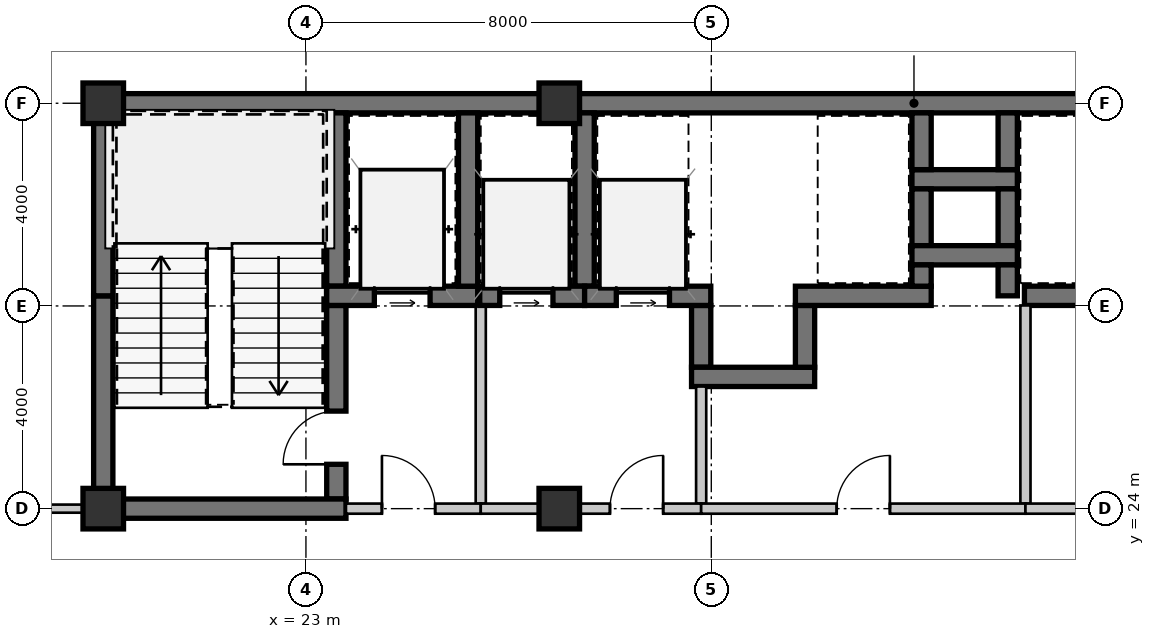
"""IFC4 building model, lengths in metres.
Left out: names, types, materials, properties, quantities, classifications, styles, units other than length and angle.
Written with IfcOpenShell. Run it as: python <this file> out.ifc"""

import sys

from ifc_helpers import new_model, si_unit, direction, frame, frame_2d, origin, origin_2d, place, context, subcontext, project, spatial, rectangle, extrude, source, transform, mapped, element, fill, save


model = new_model("IFC4")
c1 = context("Model", 3, precision=1e-05, world=origin(), true_north=direction((0.0, 1.0)))
c2 = subcontext(c1, "Body", "Model", "MODEL_VIEW")
j1 = project(units=[si_unit("LENGTHUNIT", "METRE"), si_unit("PLANEANGLEUNIT", "RADIAN")], contexts=[c1])
p1 = place(None, origin())
s1 = spatial("IfcSite", under=j1, at=p1, CompositionType="ELEMENT")
p2 = place(p1, origin())
s2 = spatial("IfcBuilding", under=s1, at=p2, CompositionType="ELEMENT")
p3 = place(p2, frame((0.0, 0.0, 32.55)))
s3 = spatial("IfcBuildingStorey", under=s2, at=p3, CompositionType="ELEMENT", Elevation=32.55)
m1 = source(origin(), c2, "Body", "SweptSolid", [
    extrude(rectangle(XDim=0.8, YDim=0.8, at=origin_2d()), origin(), (0.0, 0.0, 1.0), 3.15),
])
for number, where, z_axis, x_axis in (
    (1, (19.0, 24.0, 0.0), (0.0, 0.0, 1.0), (1.0, 0.0, 0.0)),
    (2, (28.0, 24.0, 0.0), (0.0, 0.0, 1.0), (1.0, 0.0, 0.0)),
    (3, (19.0, 32.0, 0.0), (0.0, 0.0, 1.0), (1.0, 0.0, 0.0)),
    (4, (28.0, 32.0, 0.0), (0.0, 0.0, 1.0), (1.0, 0.0, 0.0)),
):
    element("IfcColumn", number, at=place(p3, frame(where, z_axis=z_axis, x_axis=x_axis)), inside=s3, PredefinedType="COLUMN", context=c2, shape_type="MappedRepresentation", body=[
        mapped(m1, transform((0.0, 0.0, 0.0), scale=1.0)),
    ])
m2 = source(origin(), c2, "Body", "SweptSolid", [
    extrude(rectangle(XDim=9.19, YDim=0.38, at=frame_2d((4.595, 0.0))), origin(), (0.0, 0.0, 1.0), 2.93),
])
p4 = place(p3, frame((18.81, 32.0, 0.0), z_axis=(0.0, 0.0, 1.0), x_axis=(1.0, 0.0, 0.0)))
e5 = element("IfcWall", 5, at=p4, inside=s3, PredefinedType="SHEAR", context=c2, shape_type="MappedRepresentation", body=[
    mapped(m2, transform((0.0, 0.0, 0.0), scale=1.0)),
])
m3 = source(origin(), c2, "Body", "SweptSolid", [
    extrude(rectangle(XDim=11.2, YDim=0.38, at=frame_2d((5.6, 0.0))), origin(), (0.0, 0.0, 1.0), 2.93),
])
p5 = place(p3, frame((28.0, 32.0, 0.0), z_axis=(0.0, 0.0, 1.0), x_axis=(1.0, 0.0, 0.0)))
e6 = element("IfcWall", 6, at=p5, inside=s3, PredefinedType="SHEAR", context=c2, shape_type="MappedRepresentation", body=[
    mapped(m3, transform((0.0, 0.0, 0.0), scale=1.0)),
])
m4 = source(origin(), c2, "Body", "SweptSolid", [
    extrude(rectangle(XDim=4.01, YDim=0.38, at=frame_2d((2.005, 0.0))), origin(), (0.0, 0.0, 1.0), 2.93),
])
p6 = place(p3, frame((19.0, 24.19, 0.0), z_axis=(0.0, 0.0, 1.0), x_axis=(0.0, 1.0, 0.0)))
e7 = element("IfcWall", 7, at=p6, inside=s3, PredefinedType="SHEAR", context=c2, shape_type="MappedRepresentation", body=[
    mapped(m4, transform((0.0, 0.0, 0.0), scale=1.0)),
])
m5 = source(origin(), c2, "Body", "SweptSolid", [
    extrude(rectangle(XDim=3.61, YDim=0.38, at=frame_2d((1.805, 0.0))), origin(), (0.0, 0.0, 1.0), 2.93),
])
p7 = place(p3, frame((19.0, 28.2, 0.0), z_axis=(0.0, 0.0, 1.0), x_axis=(0.0, 1.0, 0.0)))
e8 = element("IfcWall", 8, at=p7, inside=s3, PredefinedType="SHEAR", context=c2, shape_type="MappedRepresentation", body=[
    mapped(m5, transform((0.0, 0.0, 0.0), scale=1.0)),
])
m6 = source(origin(), c2, "Body", "SweptSolid", [
    extrude(rectangle(XDim=3.42, YDim=0.38, at=frame_2d((1.71, 0.0))), origin(), (0.0, 0.0, 1.0), 2.93),
])
p8 = place(p3, frame((23.6, 28.39, 0.0), z_axis=(0.0, 0.0, 1.0), x_axis=(0.0, 1.0, 0.0)))
e9 = element("IfcWall", 9, at=p8, inside=s3, PredefinedType="SHEAR", context=c2, shape_type="MappedRepresentation", body=[
    mapped(m6, transform((0.0, 0.0, 0.0), scale=1.0)),
])
m7 = source(origin(), c2, "Body", "SweptSolid", [
    extrude(rectangle(XDim=3.82, YDim=0.38, at=frame_2d((1.91, 0.0))), origin(), (0.0, 0.0, 1.0), 2.93),
])
p9 = place(p3, frame((23.6, 24.19, 0.0), z_axis=(0.0, 0.0, 1.0), x_axis=(0.0, 1.0, 0.0)))
e10 = element("IfcWall", 10, at=p9, inside=s3, PredefinedType="SHEAR", context=c2, shape_type="MappedRepresentation", body=[
    mapped(m7, transform((0.0, 0.0, 0.0), scale=1.0)),
])
m8 = source(origin(), c2, "Body", "SweptSolid", [
    extrude(rectangle(XDim=1.05, YDim=2.1, at=frame_2d((0.525, 1.05))), frame((0.0, 0.2, 0.0), z_axis=(0.0, -1.0, 0.0), x_axis=(1.0, 0.0, 0.0)), (0.0, 0.0, 1.0), 0.4),
])
p10 = place(p9, frame((0.685, 0.0, 0.0)))
e11 = element("IfcOpeningElement", 11, at=p10, cuts=e10, PredefinedType="OPENING", context=c2, shape_type="MappedRepresentation", body=[
    mapped(m8, transform((0.0, 0.0, 0.0), scale=1.0)),
])
m9 = source(origin(), c2, "Body", "SweptSolid", [
    extrude(rectangle(XDim=4.98, YDim=0.38, at=frame_2d((2.49, 0.0))), origin(), (0.0, 0.0, 1.0), 2.93),
])
p11 = place(p3, frame((18.81, 24.0, 0.0), z_axis=(0.0, 0.0, 1.0), x_axis=(1.0, 0.0, 0.0)))
e12 = element("IfcWall", 12, at=p11, inside=s3, PredefinedType="SHEAR", context=c2, shape_type="MappedRepresentation", body=[
    mapped(m9, transform((0.0, 0.0, 0.0), scale=1.0)),
])
m10 = source(origin(), c2, "Body", "SweptSolid", [
    extrude(rectangle(XDim=2.98, YDim=0.38, at=frame_2d((1.49, 0.0))), origin(), (0.0, 0.0, 1.0), 2.93),
])
p12 = place(p3, frame((23.41, 28.2, 0.0), z_axis=(0.0, 0.0, 1.0), x_axis=(1.0, 0.0, 0.0)))
e13 = element("IfcWall", 13, at=p12, inside=s3, PredefinedType="SHEAR", context=c2, shape_type="MappedRepresentation", body=[
    mapped(m10, transform((0.0, 0.0, 0.0), scale=1.0)),
])
m11 = source(origin(), c2, "Body", "SweptSolid", [
    extrude(rectangle(XDim=1.1, YDim=2.15, at=frame_2d((0.55, 1.075))), frame((0.0, 0.2, 0.0), z_axis=(0.0, -1.0, 0.0), x_axis=(1.0, 0.0, 0.0)), (0.0, 0.0, 1.0), 0.4),
])
p13 = place(p12, frame((0.94, 0.0, 0.0)))
e14 = element("IfcOpeningElement", 14, at=p13, cuts=e13, PredefinedType="OPENING", context=c2, shape_type="MappedRepresentation", body=[
    mapped(m11, transform((0.0, 0.0, 0.0), scale=1.0)),
])
p14 = place(p3, frame((26.2, 28.39, 0.0), z_axis=(0.0, 0.0, 1.0), x_axis=(0.0, 1.0, 0.0)))
e15 = element("IfcWall", 15, at=p14, inside=s3, PredefinedType="SHEAR", context=c2, shape_type="MappedRepresentation", body=[
    mapped(m6, transform((0.0, 0.0, 0.0), scale=1.0)),
])
m12 = source(origin(), c2, "Body", "SweptSolid", [
    extrude(rectangle(XDim=3.91, YDim=0.2, at=frame_2d((1.955, 0.0))), origin(), (0.0, 0.0, 1.0), 2.93),
])
p15 = place(p3, frame((26.45, 24.1, 0.0), z_axis=(0.0, 0.0, 1.0), x_axis=(0.0, 1.0, 0.0)))
e16 = element("IfcWall", 16, at=p15, inside=s3, PredefinedType="SOLIDWALL", context=c2, shape_type="MappedRepresentation", body=[
    mapped(m12, transform((0.0, 0.0, 0.0), scale=1.0)),
])
m13 = source(origin(), c2, "Body", "SweptSolid", [
    extrude(rectangle(XDim=2.66, YDim=0.2, at=frame_2d((1.33, 0.0))), origin(), (0.0, 0.0, 1.0), 2.47),
])
p16 = place(p3, frame((23.79, 24.0, 0.0), z_axis=(0.0, 0.0, 1.0), x_axis=(1.0, 0.0, 0.0)))
e17 = element("IfcWall", 17, at=p16, inside=s3, PredefinedType="SOLIDWALL", context=c2, shape_type="MappedRepresentation", body=[
    mapped(m13, transform((0.0, 0.0, 0.0), scale=1.0)),
])
m14 = source(origin(), c2, "Body", "SweptSolid", [
    extrude(rectangle(XDim=1.05, YDim=2.1, at=frame_2d((0.525, 1.05))), frame((0.0, 0.11, 0.0), z_axis=(0.0, -1.0, 0.0), x_axis=(1.0, 0.0, 0.0)), (0.0, 0.0, 1.0), 0.22),
])
p17 = place(p16, frame((0.71, 0.0, 0.0)))
e18 = element("IfcOpeningElement", 18, at=p17, cuts=e17, PredefinedType="OPENING", context=c2, shape_type="MappedRepresentation", body=[
    mapped(m14, transform((0.0, 0.0, 0.0), scale=1.0)),
])
m15 = source(origin(), c2, "Body", "SweptSolid", [
    extrude(rectangle(XDim=2.08, YDim=0.38, at=frame_2d((1.04, 0.0))), origin(), (0.0, 0.0, 1.0), 2.93),
])
p18 = place(p3, frame((34.96, 30.5, 0.0), z_axis=(0.0, 0.0, 1.0), x_axis=(1.0, 0.0, 0.0)))
e19 = element("IfcWall", 19, at=p18, inside=s3, PredefinedType="SHEAR", context=c2, shape_type="MappedRepresentation", body=[
    mapped(m15, transform((0.0, 0.0, 0.0), scale=1.0)),
])
m16 = source(origin(), c2, "Body", "SweptSolid", [
    extrude(rectangle(XDim=1.12, YDim=0.38, at=frame_2d((0.56, 0.0))), origin(), (0.0, 0.0, 1.0), 2.93),
])
for number, where, z_axis, x_axis in (
    (20, (35.15, 31.81, 0.0), (0.0, 0.0, 1.0), (0.0, -1.0, 0.0)),
    (21, (36.85, 30.69, 0.0), (0.0, 0.0, 1.0), (0.0, 1.0, 0.0)),
    (22, (35.15, 30.31, 0.0), (0.0, 0.0, 1.0), (0.0, -1.0, 0.0)),
    (23, (36.85, 29.19, 0.0), (0.0, 0.0, 1.0), (0.0, 1.0, 0.0)),
):
    element("IfcWall", number, at=place(p3, frame(where, z_axis=z_axis, x_axis=x_axis)), inside=s3, PredefinedType="SHEAR", context=c2, shape_type="MappedRepresentation", body=[
        mapped(m16, transform((0.0, 0.0, 0.0), scale=1.0)),
    ])
p19 = place(p3, frame((34.96, 29.0, 0.0), z_axis=(0.0, 0.0, 1.0), x_axis=(1.0, 0.0, 0.0)))
e24 = element("IfcWall", 24, at=p19, inside=s3, PredefinedType="SHEAR", context=c2, shape_type="MappedRepresentation", body=[
    mapped(m15, transform((0.0, 0.0, 0.0), scale=1.0)),
])
m17 = source(origin(), c2, "Body", "SweptSolid", [
    extrude(rectangle(XDim=1.22, YDim=0.38, at=frame_2d((0.61, 0.0))), origin(), (0.0, 0.0, 1.0), 2.93),
])
p20 = place(p3, frame((30.8, 28.01, 0.0), z_axis=(0.0, 0.0, 1.0), x_axis=(0.0, -1.0, 0.0)))
e25 = element("IfcWall", 25, at=p20, inside=s3, PredefinedType="SHEAR", context=c2, shape_type="MappedRepresentation", body=[
    mapped(m17, transform((0.0, 0.0, 0.0), scale=1.0)),
])
m18 = source(origin(), c2, "Body", "SweptSolid", [
    extrude(rectangle(XDim=2.43, YDim=0.38, at=frame_2d((1.215, 0.0))), origin(), (0.0, 0.0, 1.0), 2.93),
])
p21 = place(p3, frame((30.61, 26.6, 0.0), z_axis=(0.0, 0.0, 1.0), x_axis=(1.0, 0.0, 0.0)))
e26 = element("IfcWall", 26, at=p21, inside=s3, PredefinedType="SHEAR", context=c2, shape_type="MappedRepresentation", body=[
    mapped(m18, transform((0.0, 0.0, 0.0), scale=1.0)),
])
p22 = place(p3, frame((32.85, 26.79, 0.0), z_axis=(0.0, 0.0, 1.0), x_axis=(0.0, 1.0, 0.0)))
e27 = element("IfcWall", 27, at=p22, inside=s3, PredefinedType="SHEAR", context=c2, shape_type="MappedRepresentation", body=[
    mapped(m17, transform((0.0, 0.0, 0.0), scale=1.0)),
])
p23 = place(p3, frame((28.5, 28.39, 0.0), z_axis=(0.0, 0.0, 1.0), x_axis=(0.0, 1.0, 0.0)))
e28 = element("IfcWall", 28, at=p23, inside=s3, PredefinedType="SHEAR", context=c2, shape_type="MappedRepresentation", body=[
    mapped(m6, transform((0.0, 0.0, 0.0), scale=1.0)),
])
m19 = source(origin(), c2, "Body", "SweptSolid", [
    extrude(rectangle(XDim=2.07, YDim=0.38, at=frame_2d((1.035, 0.0))), origin(), (0.0, 0.0, 1.0), 2.93),
])
p24 = place(p3, frame((26.43, 28.2, 0.0), z_axis=(0.0, 0.0, 1.0), x_axis=(1.0, 0.0, 0.0)))
e29 = element("IfcWall", 29, at=p24, inside=s3, PredefinedType="SHEAR", context=c2, shape_type="MappedRepresentation", body=[
    mapped(m19, transform((0.0, 0.0, 0.0), scale=1.0)),
])
m20 = source(origin(), c2, "Body", "SweptSolid", [
    extrude(rectangle(XDim=1.05, YDim=2.15, at=frame_2d((0.525, 1.075))), frame((0.0, 0.2, 0.0), z_axis=(0.0, -1.0, 0.0), x_axis=(1.0, 0.0, 0.0)), (0.0, 0.0, 1.0), 0.4),
])
p25 = place(p24, frame((0.395, 0.0, 0.0)))
e30 = element("IfcOpeningElement", 30, at=p25, cuts=e29, PredefinedType="OPENING", context=c2, shape_type="MappedRepresentation", body=[
    mapped(m20, transform((0.0, 0.0, 0.0), scale=1.0)),
])
m21 = source(origin(), c2, "Body", "SweptSolid", [
    extrude(rectangle(XDim=2.49, YDim=0.38, at=frame_2d((1.245, 0.0))), origin(), (0.0, 0.0, 1.0), 2.93),
])
p26 = place(p3, frame((28.5, 28.2, 0.0), z_axis=(0.0, 0.0, 1.0), x_axis=(1.0, 0.0, 0.0)))
e31 = element("IfcWall", 31, at=p26, inside=s3, PredefinedType="SHEAR", context=c2, shape_type="MappedRepresentation", body=[
    mapped(m21, transform((0.0, 0.0, 0.0), scale=1.0)),
])
p27 = place(p26, frame((0.625, 0.0, 0.0)))
e32 = element("IfcOpeningElement", 32, at=p27, cuts=e31, PredefinedType="OPENING", context=c2, shape_type="MappedRepresentation", body=[
    mapped(m20, transform((0.0, 0.0, 0.0), scale=1.0)),
])
m22 = source(origin(), c2, "Body", "SweptSolid", [
    extrude(rectangle(XDim=2.31, YDim=0.2, at=frame_2d((1.155, 0.0))), origin(), (0.0, 0.0, 1.0), 2.93),
])
p28 = place(p3, frame((30.8, 26.41, 0.0), z_axis=(0.0, 0.0, 1.0), x_axis=(0.0, -1.0, 0.0)))
e33 = element("IfcWall", 33, at=p28, inside=s3, PredefinedType="SOLIDWALL", context=c2, shape_type="MappedRepresentation", body=[
    mapped(m22, transform((0.0, 0.0, 0.0), scale=1.0)),
])
m23 = source(origin(), c2, "Body", "SweptSolid", [
    extrude(rectangle(XDim=4.35, YDim=0.2, at=frame_2d((2.175, 0.0))), origin(), (0.0, 0.0, 1.0), 2.47),
])
p29 = place(p3, frame((30.8, 24.0, 0.0), z_axis=(0.0, 0.0, 1.0), x_axis=(-1.0, 0.0, 0.0)))
e34 = element("IfcWall", 34, at=p29, inside=s3, PredefinedType="SOLIDWALL", context=c2, shape_type="MappedRepresentation", body=[
    mapped(m23, transform((0.0, 0.0, 0.0), scale=1.0)),
])
p30 = place(p29, frame((0.75, 0.0, 0.0)))
e35 = element("IfcOpeningElement", 35, at=p30, cuts=e34, PredefinedType="OPENING", context=c2, shape_type="MappedRepresentation", body=[
    mapped(m14, transform((0.0, 0.0, 0.0), scale=1.0)),
])
m24 = source(origin(), c2, "Body", "SweptSolid", [
    extrude(rectangle(XDim=2.68, YDim=0.38, at=frame_2d((1.34, 0.0))), origin(), (0.0, 0.0, 1.0), 2.93),
])
p31 = place(p3, frame((32.66, 28.2, 0.0), z_axis=(0.0, 0.0, 1.0), x_axis=(1.0, 0.0, 0.0)))
e36 = element("IfcWall", 36, at=p31, inside=s3, PredefinedType="SHEAR", context=c2, shape_type="MappedRepresentation", body=[
    mapped(m24, transform((0.0, 0.0, 0.0), scale=1.0)),
])
m25 = source(origin(), c2, "Body", "SweptSolid", [
    extrude(rectangle(XDim=0.42, YDim=0.38, at=frame_2d((0.21, 0.0))), origin(), (0.0, 0.0, 1.0), 2.93),
])
p32 = place(p3, frame((35.15, 28.39, 0.0), z_axis=(0.0, 0.0, 1.0), x_axis=(0.0, 1.0, 0.0)))
e37 = element("IfcWall", 37, at=p32, inside=s3, PredefinedType="SHEAR", context=c2, shape_type="MappedRepresentation", body=[
    mapped(m25, transform((0.0, 0.0, 0.0), scale=1.0)),
])
m26 = source(origin(), c2, "Body", "SweptSolid", [
    extrude(rectangle(XDim=0.61, YDim=0.38, at=frame_2d((0.305, 0.0))), origin(), (0.0, 0.0, 1.0), 2.93),
])
p33 = place(p3, frame((36.85, 28.81, 0.0), z_axis=(0.0, 0.0, 1.0), x_axis=(0.0, -1.0, 0.0)))
e38 = element("IfcWall", 38, at=p33, inside=s3, PredefinedType="SHEAR", context=c2, shape_type="MappedRepresentation", body=[
    mapped(m26, transform((0.0, 0.0, 0.0), scale=1.0)),
])
m27 = source(origin(), c2, "Body", "SweptSolid", [
    extrude(rectangle(XDim=2.02, YDim=0.38, at=frame_2d((1.01, 0.0))), origin(), (0.0, 0.0, 1.0), 2.93),
])
p34 = place(p3, frame((37.18, 28.2, 0.0), z_axis=(0.0, 0.0, 1.0), x_axis=(1.0, 0.0, 0.0)))
e39 = element("IfcWall", 39, at=p34, inside=s3, PredefinedType="SHEAR", context=c2, shape_type="MappedRepresentation", body=[
    mapped(m27, transform((0.0, 0.0, 0.0), scale=1.0)),
])
p35 = place(p3, frame((37.2, 28.01, 0.0), z_axis=(0.0, 0.0, 1.0), x_axis=(0.0, -1.0, 0.0)))
e40 = element("IfcWall", 40, at=p35, inside=s3, PredefinedType="SOLIDWALL", context=c2, shape_type="MappedRepresentation", body=[
    mapped(m12, transform((0.0, 0.0, 0.0), scale=1.0)),
])
m28 = source(origin(), c2, "Body", "SweptSolid", [
    extrude(rectangle(XDim=6.4, YDim=0.2, at=frame_2d((3.2, 0.0))), origin(), (0.0, 0.0, 1.0), 2.47),
])
p36 = place(p3, frame((37.2, 24.0, 0.0), z_axis=(0.0, 0.0, 1.0), x_axis=(-1.0, 0.0, 0.0)))
e41 = element("IfcWall", 41, at=p36, inside=s3, PredefinedType="SOLIDWALL", context=c2, shape_type="MappedRepresentation", body=[
    mapped(m28, transform((0.0, 0.0, 0.0), scale=1.0)),
])
p37 = place(p36, frame((2.675, 0.0, 0.0)))
e42 = element("IfcOpeningElement", 42, at=p37, cuts=e41, PredefinedType="OPENING", context=c2, shape_type="MappedRepresentation", body=[
    mapped(m14, transform((0.0, 0.0, 0.0), scale=1.0)),
])
m29 = source(origin(), c2, "Body", "SweptSolid", [
    extrude(rectangle(XDim=2.0, YDim=0.2, at=frame_2d((1.0, 0.0))), origin(), (0.0, 0.0, 1.0), 2.47),
])
p38 = place(p3, frame((39.2, 24.0, 0.0), z_axis=(0.0, 0.0, 1.0), x_axis=(-1.0, 0.0, 0.0)))
e43 = element("IfcWall", 43, at=p38, inside=s3, PredefinedType="SOLIDWALL", context=c2, shape_type="MappedRepresentation", body=[
    mapped(m29, transform((0.0, 0.0, 0.0), scale=1.0)),
])
m30 = source(origin(), c2, "Body", "SweptSolid", [
    extrude(rectangle(XDim=4.13, YDim=0.16, at=frame_2d((2.065, 0.0))), origin(), (0.0, 0.0, 1.0), 2.93),
])
p39 = place(p3, frame((14.68, 24.0, 0.0), z_axis=(0.0, 0.0, 1.0), x_axis=(1.0, 0.0, 0.0)))
e44 = element("IfcWall", 44, at=p39, inside=s3, PredefinedType="PARTITIONING", context=c2, shape_type="MappedRepresentation", body=[
    mapped(m30, transform((0.0, 0.0, 0.0), scale=1.0)),
])
m31 = source(origin(), c2, "Body", "SweptSolid", [
    extrude(rectangle(XDim=0.92, YDim=2.1, at=frame_2d((0.46, 1.05))), frame((0.0, 0.09, 0.0), z_axis=(0.0, -1.0, 0.0), x_axis=(1.0, 0.0, 0.0)), (0.0, 0.0, 1.0), 0.18),
])
p40 = place(p39, frame((1.69, 0.0, 0.0)))
e45 = element("IfcOpeningElement", 45, at=p40, cuts=e44, PredefinedType="OPENING", context=c2, shape_type="MappedRepresentation", body=[
    mapped(m31, transform((0.0, 0.0, 0.0), scale=1.0)),
])
m32 = source(origin(), c2, "Body", "SweptSolid", [
    extrude(rectangle(XDim=1.05, YDim=2.1, at=frame_2d((0.525, 1.05))), frame((0.0, 0.025, 0.0), z_axis=(0.0, -1.0, 0.0), x_axis=(1.0, 0.0, 0.0)), (0.0, 0.0, 1.0), 0.05),
])
p41 = place(p10, origin())
e46 = element("IfcDoor", 46, at=p41, inside=s3, OperationType="SINGLE_SWING_LEFT", PredefinedType="DOOR", context=c2, shape_type="MappedRepresentation", body=[
    mapped(m32, transform((0.0, 0.0, 0.0), scale=1.0)),
])
fill(e11, e46)
m33 = source(origin(), c2, "Body", "SweptSolid", [
    extrude(rectangle(XDim=1.1, YDim=2.15, at=frame_2d((0.55, 1.075))), frame((0.0, 0.025, 0.0), z_axis=(0.0, -1.0, 0.0), x_axis=(1.0, 0.0, 0.0)), (0.0, 0.0, 1.0), 0.05),
])
p42 = place(p13, origin())
e47 = element("IfcDoor", 47, at=p42, inside=s3, OperationType="SLIDING_TO_LEFT", PredefinedType="DOOR", context=c2, shape_type="MappedRepresentation", body=[
    mapped(m33, transform((0.0, 0.0, 0.0), scale=1.0)),
])
fill(e14, e47)
p43 = place(p17, origin())
e48 = element("IfcDoor", 48, at=p43, inside=s3, OperationType="SINGLE_SWING_LEFT", PredefinedType="DOOR", context=c2, shape_type="MappedRepresentation", body=[
    mapped(m32, transform((0.0, 0.0, 0.0), scale=1.0)),
])
fill(e18, e48)
m34 = source(origin(), c2, "Body", "SweptSolid", [
    extrude(rectangle(XDim=1.05, YDim=2.15, at=frame_2d((0.525, 1.075))), frame((0.0, 0.025, 0.0), z_axis=(0.0, -1.0, 0.0), x_axis=(1.0, 0.0, 0.0)), (0.0, 0.0, 1.0), 0.05),
])
p44 = place(p25, origin())
e49 = element("IfcDoor", 49, at=p44, inside=s3, OperationType="SLIDING_TO_LEFT", PredefinedType="DOOR", context=c2, shape_type="MappedRepresentation", body=[
    mapped(m34, transform((0.0, 0.0, 0.0), scale=1.0)),
])
fill(e30, e49)
p45 = place(p27, origin())
e50 = element("IfcDoor", 50, at=p45, inside=s3, OperationType="SLIDING_TO_LEFT", PredefinedType="DOOR", context=c2, shape_type="MappedRepresentation", body=[
    mapped(m34, transform((0.0, 0.0, 0.0), scale=1.0)),
])
fill(e32, e50)
p46 = place(p30, frame((1.05, 0.0, 0.0), z_axis=(0.0, 0.0, 1.0), x_axis=(-1.0, 0.0, 0.0)))
e51 = element("IfcDoor", 51, at=p46, inside=s3, OperationType="SINGLE_SWING_RIGHT", PredefinedType="DOOR", context=c2, shape_type="MappedRepresentation", body=[
    mapped(m32, transform((0.0, 0.0, 0.0), scale=1.0)),
])
fill(e35, e51)
p47 = place(p37, frame((1.05, 0.0, 0.0), z_axis=(0.0, 0.0, 1.0), x_axis=(-1.0, 0.0, 0.0)))
e52 = element("IfcDoor", 52, at=p47, inside=s3, OperationType="SINGLE_SWING_RIGHT", PredefinedType="DOOR", context=c2, shape_type="MappedRepresentation", body=[
    mapped(m32, transform((0.0, 0.0, 0.0), scale=1.0)),
])
fill(e42, e52)
save(model, sys.argv[1])
